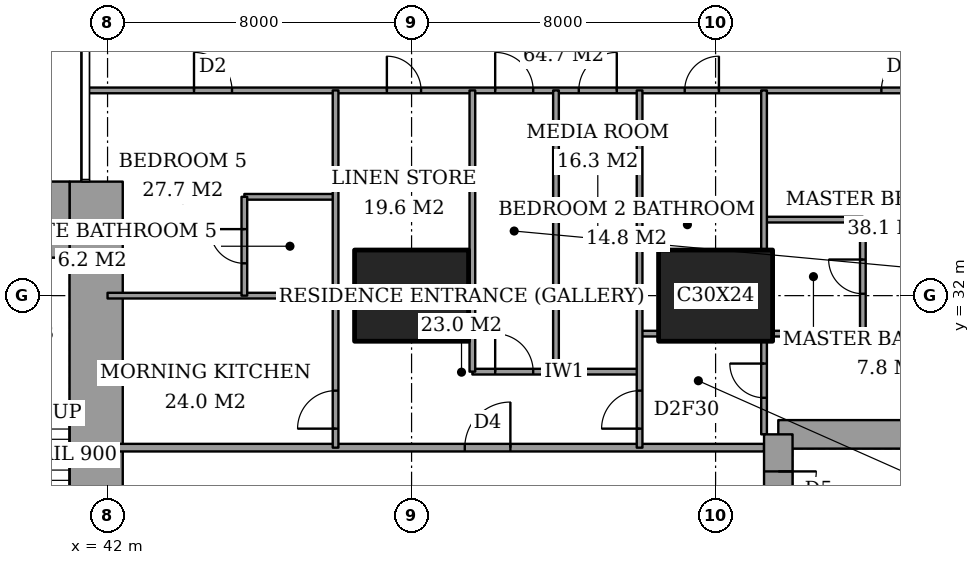
"""IFC4 building model, lengths in metres.
Left out: names, types, materials, properties, quantities, classifications, styles, units other than length and angle.
Written with IfcOpenShell. Run it as: python <this file> out.ifc"""

import sys

from ifc_helpers import new_model, si_unit, direction, frame, frame_2d, origin, origin_2d, place, context, subcontext, project, spatial, rectangle, extrude, element, fill, save


model = new_model("IFC4")
c1 = context("Model", 3, precision=1e-05, world=origin(), true_north=direction((0.0, 1.0)))
c2 = subcontext(c1, "Body", "Model", "MODEL_VIEW")
j1 = project(units=[si_unit("LENGTHUNIT", "METRE"), si_unit("PLANEANGLEUNIT", "RADIAN")], contexts=[c1])
p1 = place(None, origin())
s1 = spatial("IfcSite", under=j1, at=p1, CompositionType="ELEMENT")
p2 = place(p1, origin())
s2 = spatial("IfcBuilding", under=s1, at=p2, CompositionType="ELEMENT")
p3 = place(p2, frame((0.0, 0.0, 230.4)))
s3 = spatial("IfcBuildingStorey", under=s2, at=p3, CompositionType="ELEMENT", Elevation=230.4)
for number, where, z_axis, x_axis in (
    (1, (50.0, 32.0, 0.0), (0.0, 0.0, 1.0), (1.0, 0.0, 0.0)),
    (2, (58.0, 32.0, 0.0), (0.0, 0.0, 1.0), (1.0, 0.0, 0.0)),
):
    element("IfcColumn", number, at=place(p3, frame(where, z_axis=z_axis, x_axis=x_axis)), inside=s3, PredefinedType="COLUMN", context=c2, shape_type="SweptSolid", body=[
        extrude(rectangle(XDim=3.0, YDim=2.4, at=origin_2d()), origin(), (0.0, 0.0, 1.0), 3.6),
    ])
p4 = place(p3, frame((37.85, 34.0, 0.0), z_axis=(0.0, 0.0, 1.0), x_axis=(1.0, 0.0, 0.0)))
e3 = element("IfcWall", 3, at=p4, inside=s3, PredefinedType="SHEAR", context=c2, shape_type="SweptSolid", body=[
    extrude(rectangle(XDim=3.15, YDim=2.0, at=frame_2d((1.575, 0.0))), origin(), (0.0, 0.0, 1.0), 3.6),
])
p5 = place(p3, frame((41.7, 24.85, 0.0), z_axis=(0.0, 0.0, 1.0), x_axis=(0.0, 1.0, 0.0)))
e4 = element("IfcWall", 4, at=p5, inside=s3, PredefinedType="SHEAR", context=c2, shape_type="SweptSolid", body=[
    extrude(rectangle(XDim=10.15, YDim=1.4, at=frame_2d((5.075, 0.0))), origin(), (0.0, 0.0, 1.0), 3.6),
])
p6 = place(p3, frame((64.1, 28.35, 0.0), z_axis=(0.0, 0.0, 1.0), x_axis=(-1.0, 0.0, 0.0)))
e5 = element("IfcWall", 5, at=p6, inside=s3, PredefinedType="SHEAR", context=c2, shape_type="SweptSolid", body=[
    extrude(rectangle(XDim=4.45, YDim=0.75, at=frame_2d((2.225, 0.0))), origin(), (0.0, 0.0, 1.0), 3.6),
])
p7 = place(p3, frame((59.65, 28.35, 0.0), z_axis=(0.0, 0.0, 1.0), x_axis=(0.0, -1.0, 0.0)))
e6 = element("IfcWall", 6, at=p7, inside=s3, PredefinedType="SHEAR", context=c2, shape_type="SweptSolid", body=[
    extrude(rectangle(XDim=8.7, YDim=0.75, at=frame_2d((4.35, 0.0))), origin(), (0.0, 0.0, 1.0), 3.6),
])
p8 = place(p7, frame((0.975, 0.0, 0.0)))
e7 = element("IfcOpeningElement", 7, at=p8, cuts=e6, PredefinedType="OPENING", context=c2, shape_type="SweptSolid", body=[
    extrude(rectangle(XDim=1.0, YDim=2.1, at=frame_2d((0.5, 1.05))), frame((0.0, 0.385, 0.0), z_axis=(0.0, -1.0, 0.0), x_axis=(1.0, 0.0, 0.0)), (0.0, 0.0, 1.0), 0.77),
])
p9 = place(p3, frame((42.0, 28.0, 0.0), z_axis=(0.0, 0.0, 1.0), x_axis=(1.0, 0.0, 0.0)))
e8 = element("IfcWall", 8, at=p9, inside=s3, PredefinedType="PARTITIONING", context=c2, shape_type="SweptSolid", body=[
    extrude(rectangle(XDim=17.275, YDim=0.2, at=frame_2d((8.637, 0.0))), origin(), (0.0, 0.0, 1.0), 3.35),
])
p10 = place(p9, frame((9.4, 0.0, 0.0)))
e9 = element("IfcOpeningElement", 9, at=p10, cuts=e8, PredefinedType="OPENING", context=c2, shape_type="SweptSolid", body=[
    extrude(rectangle(XDim=1.2, YDim=2.4, at=frame_2d((0.6, 1.2))), frame((0.0, 0.11, 0.0), z_axis=(0.0, -1.0, 0.0), x_axis=(1.0, 0.0, 0.0)), (0.0, 0.0, 1.0), 0.22),
])
p11 = place(p3, frame((51.6, 30.0, 0.0), z_axis=(0.0, 0.0, 1.0), x_axis=(1.0, 0.0, 0.0)))
e10 = element("IfcWall", 10, at=p11, inside=s3, PredefinedType="PARTITIONING", context=c2, shape_type="SweptSolid", body=[
    extrude(rectangle(XDim=4.4, YDim=0.15, at=frame_2d((2.2, 0.0))), origin(), (0.0, 0.0, 1.0), 3.35),
])
p12 = place(p11, frame((0.6, 0.0, 0.0)))
e11 = element("IfcOpeningElement", 11, at=p12, cuts=e10, PredefinedType="OPENING", context=c2, shape_type="SweptSolid", body=[
    extrude(rectangle(XDim=1.0, YDim=2.1, at=frame_2d((0.5, 1.05))), frame((0.0, 0.085, 0.0), z_axis=(0.0, -1.0, 0.0), x_axis=(1.0, 0.0, 0.0)), (0.0, 0.0, 1.0), 0.17),
])
p13 = place(p3, frame((56.0, 31.0, 0.0), z_axis=(0.0, 0.0, 1.0), x_axis=(1.0, 0.0, 0.0)))
e12 = element("IfcWall", 12, at=p13, inside=s3, PredefinedType="PARTITIONING", context=c2, shape_type="SweptSolid", body=[
    extrude(rectangle(XDim=0.5, YDim=0.15, at=frame_2d((0.25, 0.0))), origin(), (0.0, 0.0, 1.0), 3.35),
])
p14 = place(p3, frame((59.5, 31.0, 0.0), z_axis=(0.0, 0.0, 1.0), x_axis=(1.0, 0.0, 0.0)))
e13 = element("IfcWall", 13, at=p14, inside=s3, PredefinedType="PARTITIONING", context=c2, shape_type="SweptSolid", body=[
    extrude(rectangle(XDim=6.95, YDim=0.15, at=frame_2d((3.475, 0.0))), origin(), (0.0, 0.0, 1.0), 3.35),
])
p15 = place(p3, frame((48.0, 31.95, 0.0), z_axis=(0.0, 0.0, 1.0), x_axis=(1.0, 0.0, 0.0)))
e14 = element("IfcWall", 14, at=p15, inside=s3, PredefinedType="PARTITIONING", context=c2, shape_type="SweptSolid", body=[
    extrude(rectangle(XDim=0.5, YDim=0.15, at=frame_2d((0.25, 0.0))), origin(), (0.0, 0.0, 1.0), 2.634),
])
p16 = place(p3, frame((42.0, 32.0, 0.0), z_axis=(0.0, 0.0, 1.0), x_axis=(1.0, 0.0, 0.0)))
e15 = element("IfcWall", 15, at=p16, inside=s3, PredefinedType="PARTITIONING", context=c2, shape_type="SweptSolid", body=[
    extrude(rectangle(XDim=6.0, YDim=0.15, at=frame_2d((3.0, 0.0))), origin(), (0.0, 0.0, 1.0), 2.634),
])
p17 = place(p3, frame((59.275, 34.0, 0.0), z_axis=(0.0, 0.0, 1.0), x_axis=(1.0, 0.0, 0.0)))
e16 = element("IfcWall", 16, at=p17, inside=s3, PredefinedType="PARTITIONING", context=c2, shape_type="SweptSolid", body=[
    extrude(rectangle(XDim=2.6, YDim=0.15, at=frame_2d((1.3, 0.0))), origin(), (0.0, 0.0, 1.0), 3.35),
])
p18 = place(p3, frame((45.6, 34.6, 0.0), z_axis=(0.0, 0.0, 1.0), x_axis=(1.0, 0.0, 0.0)))
e17 = element("IfcWall", 17, at=p18, inside=s3, PredefinedType="PARTITIONING", context=c2, shape_type="SweptSolid", body=[
    extrude(rectangle(XDim=2.4, YDim=0.15, at=frame_2d((1.2, 0.0))), origin(), (0.0, 0.0, 1.0), 3.35),
])
p19 = place(p3, frame((41.439, 37.4, 0.0), z_axis=(0.0, 0.0, 1.0), x_axis=(1.0, 0.0, 0.0)))
e18 = element("IfcWall", 18, at=p19, inside=s3, PredefinedType="PARTITIONING", context=c2, shape_type="SweptSolid", body=[
    extrude(rectangle(XDim=25.011, YDim=0.15, at=frame_2d((12.505, 0.0))), origin(), (0.0, 0.0, 1.0), 3.35),
])
p20 = place(p19, frame((10.761, 0.0, 0.0)))
e19 = element("IfcOpeningElement", 19, at=p20, cuts=e18, PredefinedType="OPENING", context=c2, shape_type="SweptSolid", body=[
    extrude(rectangle(XDim=1.0, YDim=2.1, at=frame_2d((0.5, 1.05))), frame((0.0, 0.085, 0.0), z_axis=(0.0, -1.0, 0.0), x_axis=(1.0, 0.0, 0.0)), (0.0, 0.0, 1.0), 0.17),
])
p21 = place(p19, frame((20.924, 0.0, 0.0)))
e20 = element("IfcOpeningElement", 20, at=p21, cuts=e18, PredefinedType="OPENING", context=c2, shape_type="SweptSolid", body=[
    extrude(rectangle(XDim=1.0, YDim=2.1, at=frame_2d((0.5, 1.05))), frame((0.0, 0.085, 0.0), z_axis=(0.0, -1.0, 0.0), x_axis=(1.0, 0.0, 0.0)), (0.0, 0.0, 1.0), 0.17),
])
p22 = place(p19, frame((15.749, 0.0, 0.0)))
e21 = element("IfcOpeningElement", 21, at=p22, cuts=e18, PredefinedType="OPENING", context=c2, shape_type="SweptSolid", body=[
    extrude(rectangle(XDim=0.9, YDim=2.1, at=frame_2d((0.45, 1.05))), frame((0.0, 0.085, 0.0), z_axis=(0.0, -1.0, 0.0), x_axis=(1.0, 0.0, 0.0)), (0.0, 0.0, 1.0), 0.17),
])
p23 = place(p19, frame((12.961, 0.0, 0.0)))
e22 = element("IfcOpeningElement", 22, at=p23, cuts=e18, PredefinedType="OPENING", context=c2, shape_type="SweptSolid", body=[
    extrude(rectangle(XDim=1.0, YDim=2.1, at=frame_2d((0.5, 1.05))), frame((0.0, 0.085, 0.0), z_axis=(0.0, -1.0, 0.0), x_axis=(1.0, 0.0, 0.0)), (0.0, 0.0, 1.0), 0.17),
])
p24 = place(p19, frame((7.911, 0.0, 0.0)))
e23 = element("IfcOpeningElement", 23, at=p24, cuts=e18, PredefinedType="OPENING", context=c2, shape_type="SweptSolid", body=[
    extrude(rectangle(XDim=0.9, YDim=2.1, at=frame_2d((0.45, 1.05))), frame((0.0, 0.085, 0.0), z_axis=(0.0, -1.0, 0.0), x_axis=(1.0, 0.0, 0.0)), (0.0, 0.0, 1.0), 0.17),
])
p25 = place(p19, frame((2.836, 0.0, 0.0)))
e24 = element("IfcOpeningElement", 24, at=p25, cuts=e18, PredefinedType="OPENING", context=c2, shape_type="SweptSolid", body=[
    extrude(rectangle(XDim=1.0, YDim=2.1, at=frame_2d((0.5, 1.05))), frame((0.0, 0.085, 0.0), z_axis=(0.0, -1.0, 0.0), x_axis=(1.0, 0.0, 0.0)), (0.0, 0.0, 1.0), 0.17),
])
p26 = place(p3, frame((45.6, 32.0, 0.0), z_axis=(0.0, 0.0, 1.0), x_axis=(0.0, 1.0, 0.0)))
e25 = element("IfcWall", 25, at=p26, inside=s3, PredefinedType="PARTITIONING", context=c2, shape_type="SweptSolid", body=[
    extrude(rectangle(XDim=2.6, YDim=0.15, at=frame_2d((1.3, 0.0))), origin(), (0.0, 0.0, 1.0), 3.35),
])
p27 = place(p26, frame((0.85, 0.0, 0.0)))
e26 = element("IfcOpeningElement", 26, at=p27, cuts=e25, PredefinedType="OPENING", context=c2, shape_type="SweptSolid", body=[
    extrude(rectangle(XDim=0.9, YDim=2.1, at=frame_2d((0.45, 1.05))), frame((0.0, 0.085, 0.0), z_axis=(0.0, -1.0, 0.0), x_axis=(1.0, 0.0, 0.0)), (0.0, 0.0, 1.0), 0.17),
])
p28 = place(p3, frame((48.0, 28.0, 0.0), z_axis=(0.0, 0.0, 1.0), x_axis=(0.0, 1.0, 0.0)))
e27 = element("IfcWall", 27, at=p28, inside=s3, PredefinedType="PARTITIONING", context=c2, shape_type="SweptSolid", body=[
    extrude(rectangle(XDim=9.4, YDim=0.15, at=frame_2d((4.7, 0.0))), origin(), (0.0, 0.0, 1.0), 3.35),
])
p29 = place(p28, frame((0.5, 0.0, 0.0)))
e28 = element("IfcOpeningElement", 28, at=p29, cuts=e27, PredefinedType="OPENING", context=c2, shape_type="SweptSolid", body=[
    extrude(rectangle(XDim=1.0, YDim=2.1, at=frame_2d((0.5, 1.05))), frame((0.0, 0.085, 0.0), z_axis=(0.0, -1.0, 0.0), x_axis=(1.0, 0.0, 0.0)), (0.0, 0.0, 1.0), 0.17),
])
for number, where, z_axis, x_axis in (
    (29, (51.6, 30.0, 0.0), (0.0, 0.0, 1.0), (0.0, 1.0, 0.0)),
    (30, (53.8, 30.0, 0.0), (0.0, 0.0, 1.0), (0.0, 1.0, 0.0)),
):
    element("IfcWall", number, at=place(p3, frame(where, z_axis=z_axis, x_axis=x_axis)), inside=s3, PredefinedType="PARTITIONING", context=c2, shape_type="SweptSolid", body=[
        extrude(rectangle(XDim=7.4, YDim=0.15, at=frame_2d((3.7, 0.0))), origin(), (0.0, 0.0, 1.0), 3.35),
    ])
p30 = place(p3, frame((56.0, 28.0, 0.0), z_axis=(0.0, 0.0, 1.0), x_axis=(0.0, 1.0, 0.0)))
e31 = element("IfcWall", 31, at=p30, inside=s3, PredefinedType="PARTITIONING", context=c2, shape_type="SweptSolid", body=[
    extrude(rectangle(XDim=9.4, YDim=0.15, at=frame_2d((4.7, 0.0))), origin(), (0.0, 0.0, 1.0), 3.35),
])
p31 = place(p30, frame((0.5, 0.0, 0.0)))
e32 = element("IfcOpeningElement", 32, at=p31, cuts=e31, PredefinedType="OPENING", context=c2, shape_type="SweptSolid", body=[
    extrude(rectangle(XDim=1.0, YDim=2.1, at=frame_2d((0.5, 1.05))), frame((0.0, 0.085, 0.0), z_axis=(0.0, -1.0, 0.0), x_axis=(1.0, 0.0, 0.0)), (0.0, 0.0, 1.0), 0.17),
])
p32 = place(p3, frame((59.275, 28.35, 0.0), z_axis=(0.0, 0.0, 1.0), x_axis=(0.0, 1.0, 0.0)))
e33 = element("IfcWall", 33, at=p32, inside=s3, PredefinedType="PARTITIONING", context=c2, shape_type="SweptSolid", body=[
    extrude(rectangle(XDim=2.45, YDim=0.15, at=frame_2d((1.225, 0.0))), origin(), (0.0, 0.0, 1.0), 3.35),
])
p33 = place(p32, frame((0.962, 0.0, 0.0)))
e34 = element("IfcOpeningElement", 34, at=p33, cuts=e33, PredefinedType="OPENING", context=c2, shape_type="SweptSolid", body=[
    extrude(rectangle(XDim=0.9, YDim=2.1, at=frame_2d((0.45, 1.05))), frame((0.0, 0.085, 0.0), z_axis=(0.0, -1.0, 0.0), x_axis=(1.0, 0.0, 0.0)), (0.0, 0.0, 1.0), 0.17),
])
p34 = place(p3, frame((59.275, 33.2, 0.0), z_axis=(0.0, 0.0, 1.0), x_axis=(0.0, 1.0, 0.0)))
e35 = element("IfcWall", 35, at=p34, inside=s3, PredefinedType="PARTITIONING", context=c2, shape_type="SweptSolid", body=[
    extrude(rectangle(XDim=4.2, YDim=0.15, at=frame_2d((2.1, 0.0))), origin(), (0.0, 0.0, 1.0), 3.35),
])
p35 = place(p3, frame((61.875, 31.0, 0.0), z_axis=(0.0, 0.0, 1.0), x_axis=(0.0, 1.0, 0.0)))
e36 = element("IfcWall", 36, at=p35, inside=s3, PredefinedType="PARTITIONING", context=c2, shape_type="SweptSolid", body=[
    extrude(rectangle(XDim=3.0, YDim=0.15, at=frame_2d((1.5, 0.0))), origin(), (0.0, 0.0, 1.0), 3.35),
])
p36 = place(p35, frame((1.05, 0.0, 0.0)))
e37 = element("IfcOpeningElement", 37, at=p36, cuts=e36, PredefinedType="OPENING", context=c2, shape_type="SweptSolid", body=[
    extrude(rectangle(XDim=0.9, YDim=2.1, at=frame_2d((0.45, 1.05))), frame((0.0, 0.085, 0.0), z_axis=(0.0, -1.0, 0.0), x_axis=(1.0, 0.0, 0.0)), (0.0, 0.0, 1.0), 0.17),
])
p37 = place(p20, origin())
e38 = element("IfcDoor", 38, at=p37, inside=s3, OperationType="SINGLE_SWING_RIGHT", PredefinedType="DOOR", context=c2, shape_type="SweptSolid", body=[
    extrude(rectangle(XDim=1.0, YDim=2.1, at=frame_2d((0.5, 1.05))), frame((0.0, 0.025, 0.0), z_axis=(0.0, -1.0, 0.0), x_axis=(1.0, 0.0, 0.0)), (0.0, 0.0, 1.0), 0.05),
])
fill(e19, e38)
p38 = place(p36, origin())
e39 = element("IfcDoor", 39, at=p38, inside=s3, OperationType="SINGLE_SWING_LEFT", PredefinedType="DOOR", context=c2, shape_type="SweptSolid", body=[
    extrude(rectangle(XDim=0.9, YDim=2.1, at=frame_2d((0.45, 1.05))), frame((0.0, 0.025, 0.0), z_axis=(0.0, -1.0, 0.0), x_axis=(1.0, 0.0, 0.0)), (0.0, 0.0, 1.0), 0.05),
])
fill(e37, e39)
p39 = place(p21, origin())
e40 = element("IfcDoor", 40, at=p39, inside=s3, OperationType="SINGLE_SWING_LEFT", PredefinedType="DOOR", context=c2, shape_type="SweptSolid", body=[
    extrude(rectangle(XDim=1.0, YDim=2.1, at=frame_2d((0.5, 1.05))), frame((0.0, 0.025, 0.0), z_axis=(0.0, -1.0, 0.0), x_axis=(1.0, 0.0, 0.0)), (0.0, 0.0, 1.0), 0.05),
])
fill(e20, e40)
p40 = place(p33, origin())
e41 = element("IfcDoor", 41, at=p40, inside=s3, OperationType="SINGLE_SWING_LEFT", PredefinedType="DOOR", context=c2, shape_type="SweptSolid", body=[
    extrude(rectangle(XDim=0.9, YDim=2.1, at=frame_2d((0.45, 1.05))), frame((0.0, 0.025, 0.0), z_axis=(0.0, -1.0, 0.0), x_axis=(1.0, 0.0, 0.0)), (0.0, 0.0, 1.0), 0.05),
])
fill(e34, e41)
p41 = place(p22, origin())
e42 = element("IfcDoor", 42, at=p41, inside=s3, OperationType="SINGLE_SWING_LEFT", PredefinedType="DOOR", context=c2, shape_type="SweptSolid", body=[
    extrude(rectangle(XDim=0.9, YDim=2.1, at=frame_2d((0.45, 1.05))), frame((0.0, 0.025, 0.0), z_axis=(0.0, -1.0, 0.0), x_axis=(1.0, 0.0, 0.0)), (0.0, 0.0, 1.0), 0.05),
])
fill(e21, e42)
p42 = place(p31, origin())
e43 = element("IfcDoor", 43, at=p42, inside=s3, OperationType="SINGLE_SWING_RIGHT", PredefinedType="DOOR", context=c2, shape_type="SweptSolid", body=[
    extrude(rectangle(XDim=1.0, YDim=2.1, at=frame_2d((0.5, 1.05))), frame((0.0, 0.025, 0.0), z_axis=(0.0, -1.0, 0.0), x_axis=(1.0, 0.0, 0.0)), (0.0, 0.0, 1.0), 0.05),
])
fill(e32, e43)
p43 = place(p10, origin())
e44 = element("IfcDoor", 44, at=p43, inside=s3, OperationType="SINGLE_SWING_LEFT", PredefinedType="DOOR", context=c2, shape_type="SweptSolid", body=[
    extrude(rectangle(XDim=1.2, YDim=2.4, at=frame_2d((0.6, 1.2))), frame((0.0, 0.025, 0.0), z_axis=(0.0, -1.0, 0.0), x_axis=(1.0, 0.0, 0.0)), (0.0, 0.0, 1.0), 0.05),
])
fill(e9, e44)
p44 = place(p23, origin())
e45 = element("IfcDoor", 45, at=p44, inside=s3, OperationType="SINGLE_SWING_LEFT", PredefinedType="DOOR", context=c2, shape_type="SweptSolid", body=[
    extrude(rectangle(XDim=1.0, YDim=2.1, at=frame_2d((0.5, 1.05))), frame((0.0, 0.025, 0.0), z_axis=(0.0, -1.0, 0.0), x_axis=(1.0, 0.0, 0.0)), (0.0, 0.0, 1.0), 0.05),
])
fill(e22, e45)
p45 = place(p12, origin())
e46 = element("IfcDoor", 46, at=p45, inside=s3, OperationType="SINGLE_SWING_RIGHT", PredefinedType="DOOR", context=c2, shape_type="SweptSolid", body=[
    extrude(rectangle(XDim=1.0, YDim=2.1, at=frame_2d((0.5, 1.05))), frame((0.0, 0.025, 0.0), z_axis=(0.0, -1.0, 0.0), x_axis=(1.0, 0.0, 0.0)), (0.0, 0.0, 1.0), 0.05),
])
fill(e11, e46)
p46 = place(p24, origin())
e47 = element("IfcDoor", 47, at=p46, inside=s3, OperationType="SINGLE_SWING_RIGHT", PredefinedType="DOOR", context=c2, shape_type="SweptSolid", body=[
    extrude(rectangle(XDim=0.9, YDim=2.1, at=frame_2d((0.45, 1.05))), frame((0.0, 0.025, 0.0), z_axis=(0.0, -1.0, 0.0), x_axis=(1.0, 0.0, 0.0)), (0.0, 0.0, 1.0), 0.05),
])
fill(e23, e47)
p47 = place(p27, origin())
e48 = element("IfcDoor", 48, at=p47, inside=s3, OperationType="SINGLE_SWING_LEFT", PredefinedType="DOOR", context=c2, shape_type="SweptSolid", body=[
    extrude(rectangle(XDim=0.9, YDim=2.1, at=frame_2d((0.45, 1.05))), frame((0.0, 0.025, 0.0), z_axis=(0.0, -1.0, 0.0), x_axis=(1.0, 0.0, 0.0)), (0.0, 0.0, 1.0), 0.05),
])
fill(e26, e48)
p48 = place(p25, origin())
e49 = element("IfcDoor", 49, at=p48, inside=s3, OperationType="SINGLE_SWING_RIGHT", PredefinedType="DOOR", context=c2, shape_type="SweptSolid", body=[
    extrude(rectangle(XDim=1.0, YDim=2.1, at=frame_2d((0.5, 1.05))), frame((0.0, 0.025, 0.0), z_axis=(0.0, -1.0, 0.0), x_axis=(1.0, 0.0, 0.0)), (0.0, 0.0, 1.0), 0.05),
])
fill(e24, e49)
p49 = place(p29, origin())
e50 = element("IfcDoor", 50, at=p49, inside=s3, OperationType="SINGLE_SWING_RIGHT", PredefinedType="DOOR", context=c2, shape_type="SweptSolid", body=[
    extrude(rectangle(XDim=1.0, YDim=2.1, at=frame_2d((0.5, 1.05))), frame((0.0, 0.025, 0.0), z_axis=(0.0, -1.0, 0.0), x_axis=(1.0, 0.0, 0.0)), (0.0, 0.0, 1.0), 0.05),
])
fill(e28, e50)
p50 = place(p8, origin())
e51 = element("IfcDoor", 51, at=p50, inside=s3, OperationType="SINGLE_SWING_RIGHT", PredefinedType="DOOR", context=c2, shape_type="SweptSolid", body=[
    extrude(rectangle(XDim=1.0, YDim=2.1, at=frame_2d((0.5, 1.05))), frame((0.0, 0.025, 0.0), z_axis=(0.0, -1.0, 0.0), x_axis=(1.0, 0.0, 0.0)), (0.0, 0.0, 1.0), 0.05),
])
fill(e7, e51)
save(model, sys.argv[1])
